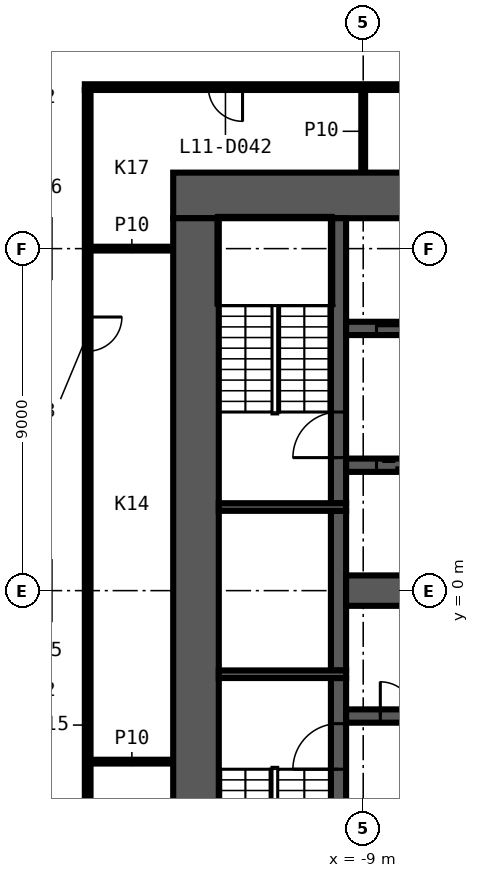
"""IFC4 building model, lengths in metres.
Left out: names, types, materials, properties, quantities, classifications, styles, units other than length and angle.
Written with IfcOpenShell. Run it as: python <this file> out.ifc"""

import sys

from ifc_helpers import new_model, si_unit, direction, frame, frame_2d, origin, place, context, subcontext, project, spatial, rectangle, extrude, element, fill, save


model = new_model("IFC4")
c1 = context("Model", 3, precision=1e-05, world=origin(), true_north=direction((0.0, 1.0)))
c2 = subcontext(c1, "Body", "Model", "MODEL_VIEW")
j1 = project(units=[si_unit("LENGTHUNIT", "METRE"), si_unit("PLANEANGLEUNIT", "RADIAN")], contexts=[c1])
p1 = place(None, origin())
s1 = spatial("IfcSite", under=j1, at=p1, CompositionType="ELEMENT")
p2 = place(p1, origin())
s2 = spatial("IfcBuilding", under=s1, at=p2, CompositionType="ELEMENT")
p3 = place(p2, frame((0.0, 0.0, 62.5)))
s3 = spatial("IfcBuildingStorey", under=s2, at=p3, CompositionType="ELEMENT", Elevation=62.5)
for number, where, z_axis, x_axis in (
    (1, (-16.175, -4.5, 0.0), (0.0, 0.0, 1.0), (1.0, 0.0, 0.0)),
    (2, (-16.175, 9.0, 0.0), (0.0, 0.0, 1.0), (1.0, 0.0, 0.0)),
):
    element("IfcWall", number, at=place(p3, frame(where, z_axis=z_axis, x_axis=x_axis)), inside=s3, PredefinedType="PARTITIONING", context=c2, shape_type="SweptSolid", body=[
        extrude(rectangle(XDim=2.175, YDim=0.1, at=frame_2d((1.087, 0.0))), origin(), (0.0, 0.0, 1.0), 3.3),
    ])
p4 = place(p3, frame((1.425, 13.25, 0.0), z_axis=(0.0, 0.0, 1.0), x_axis=(-1.0, 0.0, 0.0)))
e3 = element("IfcWall", 3, at=p4, inside=s3, PredefinedType="PARTITIONING", context=c2, shape_type="SweptSolid", body=[
    extrude(rectangle(XDim=17.75, YDim=0.15, at=frame_2d((8.875, 0.0))), origin(), (0.0, 0.0, 1.0), 3.3),
])
p5 = place(p4, frame((7.725, 0.0, 0.0)))
e4 = element("IfcOpeningElement", 4, at=p5, cuts=e3, PredefinedType="OPENING", context=c2, shape_type="SweptSolid", body=[
    extrude(rectangle(XDim=0.9, YDim=2.1, at=frame_2d((0.45, 1.05))), frame((0.0, 0.085, 0.0), z_axis=(0.0, -1.0, 0.0), x_axis=(1.0, 0.0, 0.0)), (0.0, 0.0, 1.0), 0.17),
])
p6 = place(p4, frame((13.6, 0.0, 0.0)))
e5 = element("IfcOpeningElement", 5, at=p6, cuts=e3, PredefinedType="OPENING", context=c2, shape_type="SweptSolid", body=[
    extrude(rectangle(XDim=0.9, YDim=2.1, at=frame_2d((0.45, 1.05))), frame((0.0, 0.085, 0.0), z_axis=(0.0, -1.0, 0.0), x_axis=(1.0, 0.0, 0.0)), (0.0, 0.0, 1.0), 0.17),
])
p7 = place(p3, frame((-9.0, 11.0, 0.0), z_axis=(0.0, 0.0, 1.0), x_axis=(0.0, 1.0, 0.0)))
e6 = element("IfcWall", 6, at=p7, inside=s3, PredefinedType="PARTITIONING", context=c2, shape_type="SweptSolid", body=[
    extrude(rectangle(XDim=2.175, YDim=0.1, at=frame_2d((1.087, 0.0))), origin(), (0.0, 0.0, 1.0), 3.3),
])
p8 = place(p3, frame((-16.25, 13.175, 0.0), z_axis=(0.0, 0.0, 1.0), x_axis=(0.0, -1.0, 0.0)))
e7 = element("IfcWall", 7, at=p8, inside=s3, PredefinedType="PARTITIONING", context=c2, shape_type="SweptSolid", body=[
    extrude(rectangle(XDim=26.35, YDim=0.15, at=frame_2d((13.175, 0.0))), origin(), (0.0, 0.0, 1.0), 3.3),
])
p9 = place(p8, frame((5.975, 0.0, 0.0)))
e8 = element("IfcOpeningElement", 8, at=p9, cuts=e7, PredefinedType="OPENING", context=c2, shape_type="SweptSolid", body=[
    extrude(rectangle(XDim=0.9, YDim=2.1, at=frame_2d((0.45, 1.05))), frame((0.0, 0.085, 0.0), z_axis=(0.0, -1.0, 0.0), x_axis=(1.0, 0.0, 0.0)), (0.0, 0.0, 1.0), 0.17),
])
p10 = place(p3, frame((-14.0, 10.4, 0.0), z_axis=(0.0, 0.0, 1.0), x_axis=(1.0, 0.0, 0.0)))
e9 = element("IfcWall", 9, at=p10, inside=s3, PredefinedType="SHEAR", context=c2, shape_type="SweptSolid", body=[
    extrude(rectangle(XDim=28.0, YDim=1.2, at=frame_2d((14.0, 0.0))), origin(), (0.0, 0.0, 1.0), 3.3),
])
p11 = place(p10, frame((15.9, 0.0, 0.0)))
e10 = element("IfcOpeningElement", 10, at=p11, cuts=e9, PredefinedType="OPENING", context=c2, shape_type="SweptSolid", body=[
    extrude(rectangle(XDim=1.6, YDim=2.1, at=frame_2d((0.8, 1.05))), frame((0.0, 0.61, 0.0), z_axis=(0.0, -1.0, 0.0), x_axis=(1.0, 0.0, 0.0)), (0.0, 0.0, 1.0), 1.22),
])
p12 = place(p3, frame((-13.4, -9.8, 0.0), z_axis=(0.0, 0.0, 1.0), x_axis=(0.0, 1.0, 0.0)))
e11 = element("IfcWall", 11, at=p12, inside=s3, PredefinedType="SHEAR", context=c2, shape_type="SweptSolid", body=[
    extrude(rectangle(XDim=19.6, YDim=1.2, at=frame_2d((9.8, 0.0))), origin(), (0.0, 0.0, 1.0), 3.3),
])
p13 = place(p3, frame((-9.65, -9.8, 0.0), z_axis=(0.0, 0.0, 1.0), x_axis=(0.0, 1.0, 0.0)))
e12 = element("IfcWall", 12, at=p13, inside=s3, PredefinedType="SHEAR", context=c2, shape_type="SweptSolid", body=[
    extrude(rectangle(XDim=7.5, YDim=0.4, at=frame_2d((3.75, 0.0))), origin(), (0.0, 0.0, 1.0), 3.3),
])
p14 = place(p13, frame((5.1, 0.0, 0.0)))
e13 = element("IfcOpeningElement", 13, at=p14, cuts=e12, PredefinedType="OPENING", context=c2, shape_type="SweptSolid", body=[
    extrude(rectangle(XDim=1.2, YDim=2.1, at=frame_2d((0.6, 1.05))), frame((0.0, 0.21, 0.0), z_axis=(0.0, -1.0, 0.0), x_axis=(1.0, 0.0, 0.0)), (0.0, 0.0, 1.0), 0.42),
])
p15 = place(p3, frame((-9.65, -2.1, 0.0), z_axis=(0.0, 0.0, 1.0), x_axis=(0.0, 1.0, 0.0)))
e14 = element("IfcWall", 14, at=p15, inside=s3, PredefinedType="SHEAR", context=c2, shape_type="SweptSolid", body=[
    extrude(rectangle(XDim=4.2, YDim=0.4, at=frame_2d((2.1, 0.0))), origin(), (0.0, 0.0, 1.0), 3.3),
])
p16 = place(p3, frame((-9.65, 2.3, 0.0), z_axis=(0.0, 0.0, 1.0), x_axis=(0.0, 1.0, 0.0)))
e15 = element("IfcWall", 15, at=p16, inside=s3, PredefinedType="SHEAR", context=c2, shape_type="SweptSolid", body=[
    extrude(rectangle(XDim=7.5, YDim=0.4, at=frame_2d((3.75, 0.0))), origin(), (0.0, 0.0, 1.0), 3.3),
])
p17 = place(p16, frame((1.2, 0.0, 0.0)))
e16 = element("IfcOpeningElement", 16, at=p17, cuts=e15, PredefinedType="OPENING", context=c2, shape_type="SweptSolid", body=[
    extrude(rectangle(XDim=1.2, YDim=2.1, at=frame_2d((0.6, 1.05))), frame((0.0, 0.21, 0.0), z_axis=(0.0, -1.0, 0.0), x_axis=(1.0, 0.0, 0.0)), (0.0, 0.0, 1.0), 0.42),
])
for number, where, z_axis, x_axis in (
    (17, (-9.45, 2.2, 0.0), (0.0, 0.0, 1.0), (-1.0, 0.0, 0.0)),
    (18, (-9.45, -2.2, 0.0), (0.0, 0.0, 1.0), (-1.0, 0.0, 0.0)),
):
    element("IfcWall", number, at=place(p3, frame(where, z_axis=z_axis, x_axis=x_axis)), inside=s3, PredefinedType="SHEAR", context=c2, shape_type="SweptSolid", body=[
        extrude(rectangle(XDim=3.35, YDim=0.2, at=frame_2d((1.675, 0.0))), origin(), (0.0, 0.0, 1.0), 3.3),
    ])
p18 = place(p3, frame((-9.45, 6.9, 0.0), z_axis=(0.0, 0.0, 1.0), x_axis=(1.0, 0.0, 0.0)))
e19 = element("IfcWall", 19, at=p18, inside=s3, PredefinedType="SHEAR", context=c2, shape_type="SweptSolid", body=[
    extrude(rectangle(XDim=18.9, YDim=0.35, at=frame_2d((9.45, 0.0))), origin(), (0.0, 0.0, 1.0), 3.3),
])
p19 = place(p18, frame((0.8, 0.0, 0.0)))
e20 = element("IfcOpeningElement", 20, at=p19, cuts=e19, PredefinedType="OPENING", context=c2, shape_type="SweptSolid", body=[
    extrude(rectangle(XDim=1.1, YDim=2.1, at=frame_2d((0.55, 1.05))), frame((0.0, 0.185, 0.0), z_axis=(0.0, -1.0, 0.0), x_axis=(1.0, 0.0, 0.0)), (0.0, 0.0, 1.0), 0.37),
])
p20 = place(p18, frame((3.5, 0.0, 0.0)))
e21 = element("IfcOpeningElement", 21, at=p20, cuts=e19, PredefinedType="OPENING", context=c2, shape_type="SweptSolid", body=[
    extrude(rectangle(XDim=1.1, YDim=2.1, at=frame_2d((0.55, 1.05))), frame((0.0, 0.185, 0.0), z_axis=(0.0, -1.0, 0.0), x_axis=(1.0, 0.0, 0.0)), (0.0, 0.0, 1.0), 0.37),
])
p21 = place(p18, frame((6.2, 0.0, 0.0)))
e22 = element("IfcOpeningElement", 22, at=p21, cuts=e19, PredefinedType="OPENING", context=c2, shape_type="SweptSolid", body=[
    extrude(rectangle(XDim=1.1, YDim=2.1, at=frame_2d((0.55, 1.05))), frame((0.0, 0.185, 0.0), z_axis=(0.0, -1.0, 0.0), x_axis=(1.0, 0.0, 0.0)), (0.0, 0.0, 1.0), 0.37),
])
p22 = place(p18, frame((8.9, 0.0, 0.0)))
e23 = element("IfcOpeningElement", 23, at=p22, cuts=e19, PredefinedType="OPENING", context=c2, shape_type="SweptSolid", body=[
    extrude(rectangle(XDim=1.1, YDim=2.1, at=frame_2d((0.55, 1.05))), frame((0.0, 0.185, 0.0), z_axis=(0.0, -1.0, 0.0), x_axis=(1.0, 0.0, 0.0)), (0.0, 0.0, 1.0), 0.37),
])
p23 = place(p18, frame((11.55, 0.0, 0.0)))
e24 = element("IfcOpeningElement", 24, at=p23, cuts=e19, PredefinedType="OPENING", context=c2, shape_type="SweptSolid", body=[
    extrude(rectangle(XDim=1.2, YDim=2.1, at=frame_2d((0.6, 1.05))), frame((0.0, 0.185, 0.0), z_axis=(0.0, -1.0, 0.0), x_axis=(1.0, 0.0, 0.0)), (0.0, 0.0, 1.0), 0.37),
])
p24 = place(p18, frame((14.3, 0.0, 0.0)))
e25 = element("IfcOpeningElement", 25, at=p24, cuts=e19, PredefinedType="OPENING", context=c2, shape_type="SweptSolid", body=[
    extrude(rectangle(XDim=1.1, YDim=2.1, at=frame_2d((0.55, 1.05))), frame((0.0, 0.185, 0.0), z_axis=(0.0, -1.0, 0.0), x_axis=(1.0, 0.0, 0.0)), (0.0, 0.0, 1.0), 0.37),
])
p25 = place(p18, frame((17.0, 0.0, 0.0)))
e26 = element("IfcOpeningElement", 26, at=p25, cuts=e19, PredefinedType="OPENING", context=c2, shape_type="SweptSolid", body=[
    extrude(rectangle(XDim=1.1, YDim=2.1, at=frame_2d((0.55, 1.05))), frame((0.0, 0.185, 0.0), z_axis=(0.0, -1.0, 0.0), x_axis=(1.0, 0.0, 0.0)), (0.0, 0.0, 1.0), 0.37),
])
p26 = place(p3, frame((9.45, 3.3, 0.0), z_axis=(0.0, 0.0, 1.0), x_axis=(-1.0, 0.0, 0.0)))
e27 = element("IfcWall", 27, at=p26, inside=s3, PredefinedType="SHEAR", context=c2, shape_type="SweptSolid", body=[
    extrude(rectangle(XDim=18.9, YDim=0.35, at=frame_2d((9.45, 0.0))), origin(), (0.0, 0.0, 1.0), 3.3),
])
p27 = place(p26, frame((17.0, 0.0, 0.0)))
e28 = element("IfcOpeningElement", 28, at=p27, cuts=e27, PredefinedType="OPENING", context=c2, shape_type="SweptSolid", body=[
    extrude(rectangle(XDim=1.1, YDim=2.1, at=frame_2d((0.55, 1.05))), frame((0.0, 0.185, 0.0), z_axis=(0.0, -1.0, 0.0), x_axis=(1.0, 0.0, 0.0)), (0.0, 0.0, 1.0), 0.37),
])
p28 = place(p26, frame((14.3, 0.0, 0.0)))
e29 = element("IfcOpeningElement", 29, at=p28, cuts=e27, PredefinedType="OPENING", context=c2, shape_type="SweptSolid", body=[
    extrude(rectangle(XDim=1.1, YDim=2.1, at=frame_2d((0.55, 1.05))), frame((0.0, 0.185, 0.0), z_axis=(0.0, -1.0, 0.0), x_axis=(1.0, 0.0, 0.0)), (0.0, 0.0, 1.0), 0.37),
])
p29 = place(p26, frame((11.6, 0.0, 0.0)))
e30 = element("IfcOpeningElement", 30, at=p29, cuts=e27, PredefinedType="OPENING", context=c2, shape_type="SweptSolid", body=[
    extrude(rectangle(XDim=1.1, YDim=2.1, at=frame_2d((0.55, 1.05))), frame((0.0, 0.185, 0.0), z_axis=(0.0, -1.0, 0.0), x_axis=(1.0, 0.0, 0.0)), (0.0, 0.0, 1.0), 0.37),
])
p30 = place(p26, frame((8.9, 0.0, 0.0)))
e31 = element("IfcOpeningElement", 31, at=p30, cuts=e27, PredefinedType="OPENING", context=c2, shape_type="SweptSolid", body=[
    extrude(rectangle(XDim=1.1, YDim=2.1, at=frame_2d((0.55, 1.05))), frame((0.0, 0.185, 0.0), z_axis=(0.0, -1.0, 0.0), x_axis=(1.0, 0.0, 0.0)), (0.0, 0.0, 1.0), 0.37),
])
p31 = place(p26, frame((6.2, 0.0, 0.0)))
e32 = element("IfcOpeningElement", 32, at=p31, cuts=e27, PredefinedType="OPENING", context=c2, shape_type="SweptSolid", body=[
    extrude(rectangle(XDim=1.1, YDim=2.1, at=frame_2d((0.55, 1.05))), frame((0.0, 0.185, 0.0), z_axis=(0.0, -1.0, 0.0), x_axis=(1.0, 0.0, 0.0)), (0.0, 0.0, 1.0), 0.37),
])
p32 = place(p26, frame((3.5, 0.0, 0.0)))
e33 = element("IfcOpeningElement", 33, at=p32, cuts=e27, PredefinedType="OPENING", context=c2, shape_type="SweptSolid", body=[
    extrude(rectangle(XDim=1.1, YDim=2.1, at=frame_2d((0.55, 1.05))), frame((0.0, 0.185, 0.0), z_axis=(0.0, -1.0, 0.0), x_axis=(1.0, 0.0, 0.0)), (0.0, 0.0, 1.0), 0.37),
])
p33 = place(p26, frame((0.9, 0.0, 0.0)))
e34 = element("IfcOpeningElement", 34, at=p33, cuts=e27, PredefinedType="OPENING", context=c2, shape_type="SweptSolid", body=[
    extrude(rectangle(XDim=0.9, YDim=2.1, at=frame_2d((0.45, 1.05))), frame((0.0, 0.185, 0.0), z_axis=(0.0, -1.0, 0.0), x_axis=(1.0, 0.0, 0.0)), (0.0, 0.0, 1.0), 0.37),
])
p34 = place(p3, frame((-9.45, -3.3, 0.0), z_axis=(0.0, 0.0, 1.0), x_axis=(1.0, 0.0, 0.0)))
e35 = element("IfcWall", 35, at=p34, inside=s3, PredefinedType="SHEAR", context=c2, shape_type="SweptSolid", body=[
    extrude(rectangle(XDim=18.9, YDim=0.35, at=frame_2d((9.45, 0.0))), origin(), (0.0, 0.0, 1.0), 3.3),
])
p35 = place(p34, frame((17.0, 0.0, 0.0)))
e36 = element("IfcOpeningElement", 36, at=p35, cuts=e35, PredefinedType="OPENING", context=c2, shape_type="SweptSolid", body=[
    extrude(rectangle(XDim=1.1, YDim=2.1, at=frame_2d((0.55, 1.05))), frame((0.0, 0.185, 0.0), z_axis=(0.0, -1.0, 0.0), x_axis=(1.0, 0.0, 0.0)), (0.0, 0.0, 1.0), 0.37),
])
p36 = place(p34, frame((0.9, 0.0, 0.0)))
e37 = element("IfcOpeningElement", 37, at=p36, cuts=e35, PredefinedType="OPENING", context=c2, shape_type="SweptSolid", body=[
    extrude(rectangle(XDim=0.9, YDim=2.1, at=frame_2d((0.45, 1.05))), frame((0.0, 0.185, 0.0), z_axis=(0.0, -1.0, 0.0), x_axis=(1.0, 0.0, 0.0)), (0.0, 0.0, 1.0), 0.37),
])
p37 = place(p34, frame((6.3, 0.0, 0.0)))
e38 = element("IfcOpeningElement", 38, at=p37, cuts=e35, PredefinedType="OPENING", context=c2, shape_type="SweptSolid", body=[
    extrude(rectangle(XDim=0.9, YDim=2.1, at=frame_2d((0.45, 1.05))), frame((0.0, 0.185, 0.0), z_axis=(0.0, -1.0, 0.0), x_axis=(1.0, 0.0, 0.0)), (0.0, 0.0, 1.0), 0.37),
])
p38 = place(p3, frame((-9.45, 0.0, 0.0), z_axis=(0.0, 0.0, 1.0), x_axis=(1.0, 0.0, 0.0)))
e39 = element("IfcWall", 39, at=p38, inside=s3, PredefinedType="SHEAR", context=c2, shape_type="SweptSolid", body=[
    extrude(rectangle(XDim=18.9, YDim=0.8, at=frame_2d((9.45, 0.0))), origin(), (0.0, 0.0, 1.0), 3.3),
])
p39 = place(p6, origin())
e40 = element("IfcDoor", 40, at=p39, inside=s3, OperationType="SINGLE_SWING_LEFT", PredefinedType="DOOR", context=c2, shape_type="SweptSolid", body=[
    extrude(rectangle(XDim=0.9, YDim=2.1, at=frame_2d((0.45, 1.05))), frame((0.0, 0.025, 0.0), z_axis=(0.0, -1.0, 0.0), x_axis=(1.0, 0.0, 0.0)), (0.0, 0.0, 1.0), 0.05),
])
fill(e5, e40)
p40 = place(p9, origin())
e41 = element("IfcDoor", 41, at=p40, inside=s3, OperationType="SINGLE_SWING_RIGHT", PredefinedType="DOOR", context=c2, shape_type="SweptSolid", body=[
    extrude(rectangle(XDim=0.9, YDim=2.1, at=frame_2d((0.45, 1.05))), frame((0.0, 0.025, 0.0), z_axis=(0.0, -1.0, 0.0), x_axis=(1.0, 0.0, 0.0)), (0.0, 0.0, 1.0), 0.05),
])
fill(e8, e41)
p41 = place(p19, origin())
e42 = element("IfcDoor", 42, at=p41, inside=s3, OperationType="DOUBLE_DOOR_SLIDING", PredefinedType="DOOR", context=c2, shape_type="SweptSolid", body=[
    extrude(rectangle(XDim=1.1, YDim=2.1, at=frame_2d((0.55, 1.05))), frame((0.0, 0.025, 0.0), z_axis=(0.0, -1.0, 0.0), x_axis=(1.0, 0.0, 0.0)), (0.0, 0.0, 1.0), 0.05),
])
fill(e20, e42)
p42 = place(p27, origin())
e43 = element("IfcDoor", 43, at=p42, inside=s3, OperationType="DOUBLE_DOOR_SLIDING", PredefinedType="DOOR", context=c2, shape_type="SweptSolid", body=[
    extrude(rectangle(XDim=1.1, YDim=2.1, at=frame_2d((0.55, 1.05))), frame((0.0, 0.025, 0.0), z_axis=(0.0, -1.0, 0.0), x_axis=(1.0, 0.0, 0.0)), (0.0, 0.0, 1.0), 0.05),
])
fill(e28, e43)
p43 = place(p36, origin())
e44 = element("IfcDoor", 44, at=p43, inside=s3, OperationType="SINGLE_SWING_RIGHT", PredefinedType="DOOR", context=c2, shape_type="SweptSolid", body=[
    extrude(rectangle(XDim=0.9, YDim=2.1, at=frame_2d((0.45, 1.05))), frame((0.0, 0.025, 0.0), z_axis=(0.0, -1.0, 0.0), x_axis=(1.0, 0.0, 0.0)), (0.0, 0.0, 1.0), 0.05),
])
fill(e37, e44)
p44 = place(p17, origin())
e45 = element("IfcDoor", 45, at=p44, inside=s3, OperationType="SINGLE_SWING_RIGHT", PredefinedType="DOOR", context=c2, shape_type="SweptSolid", body=[
    extrude(rectangle(XDim=1.2, YDim=2.1, at=frame_2d((0.6, 1.05))), frame((0.0, 0.025, 0.0), z_axis=(0.0, -1.0, 0.0), x_axis=(1.0, 0.0, 0.0)), (0.0, 0.0, 1.0), 0.05),
])
fill(e16, e45)
p45 = place(p14, origin())
e46 = element("IfcDoor", 46, at=p45, inside=s3, OperationType="SINGLE_SWING_LEFT", PredefinedType="DOOR", context=c2, shape_type="SweptSolid", body=[
    extrude(rectangle(XDim=1.2, YDim=2.1, at=frame_2d((0.6, 1.05))), frame((0.0, 0.025, 0.0), z_axis=(0.0, -1.0, 0.0), x_axis=(1.0, 0.0, 0.0)), (0.0, 0.0, 1.0), 0.05),
])
fill(e13, e46)
save(model, sys.argv[1])
